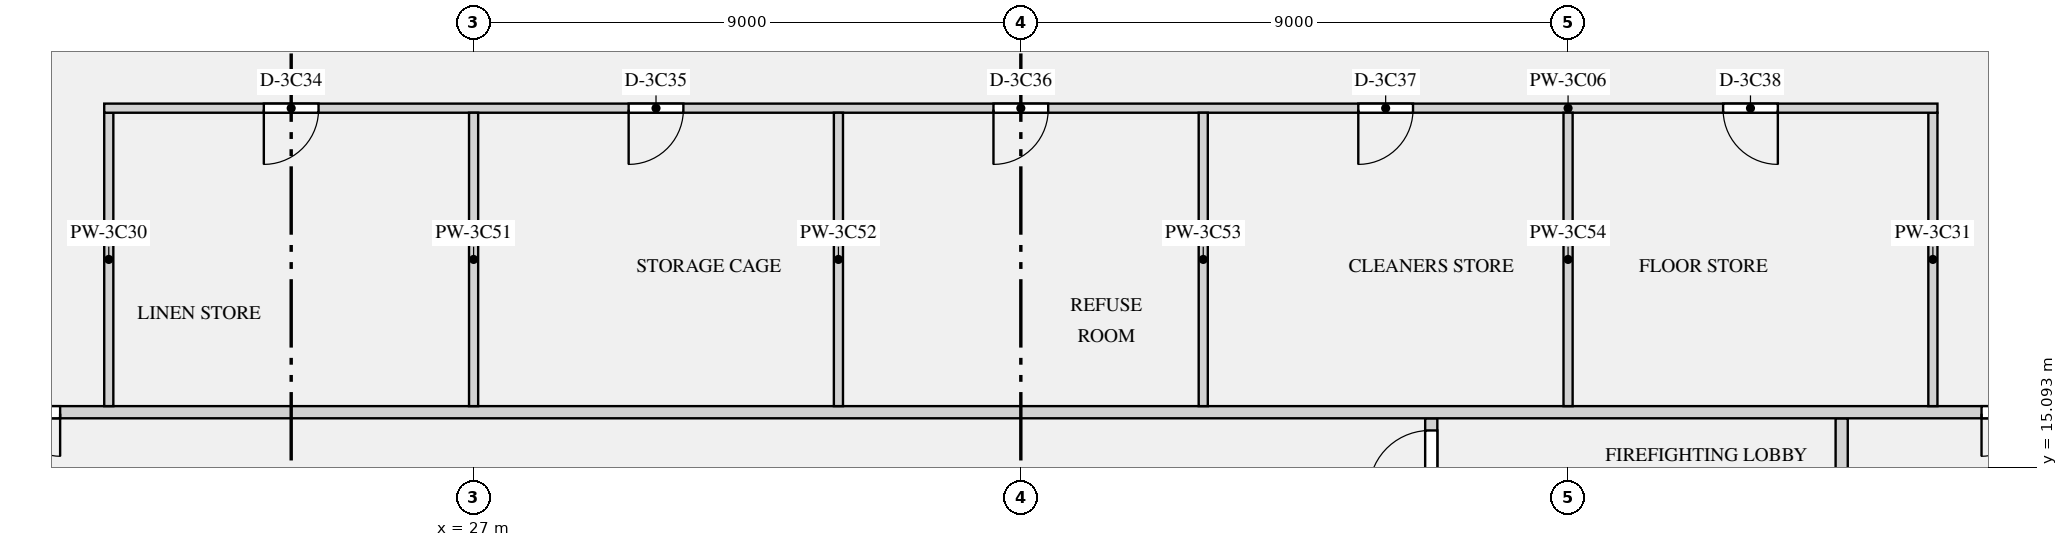
"""IFC4 building model, lengths in metres.
Left out: names, types, materials, properties, quantities, classifications, styles, units other than length and angle.
Written with IfcOpenShell. Run it as: python <this file> out.ifc"""

import sys

from ifc_helpers import new_model, si_unit, direction, frame, frame_2d, origin, place, context, subcontext, project, spatial, rectangle, extrude, element, fill, save


model = new_model("IFC4")
c1 = context("Model", 3, precision=1e-05, world=origin(), true_north=direction((0.0, 1.0)))
c2 = subcontext(c1, "Body", "Model", "MODEL_VIEW")
j1 = project(units=[si_unit("LENGTHUNIT", "METRE"), si_unit("PLANEANGLEUNIT", "RADIAN")], contexts=[c1])
p1 = place(None, origin())
s1 = spatial("IfcSite", under=j1, at=p1, CompositionType="ELEMENT")
p2 = place(p1, origin())
s2 = spatial("IfcBuilding", under=s1, at=p2, CompositionType="ELEMENT")
p3 = place(p2, frame((0.0, 0.0, 160.2)))
s3 = spatial("IfcBuildingStorey", under=s2, at=p3, CompositionType="ELEMENT", Elevation=160.2)
p4 = place(p3, frame((49.5, 12.5, 0.0), z_axis=(0.0, 0.0, 1.0), x_axis=(0.0, 1.0, 0.0)))
e1 = element("IfcWall", 1, at=p4, inside=s3, PredefinedType="PARTITIONING", context=c2, shape_type="SweptSolid", body=[
    extrude(rectangle(XDim=3.4, YDim=0.2, at=frame_2d((1.7, 0.0))), origin(), (0.0, 0.0, 1.0), 2.83),
])
p5 = place(p4, frame((1.15, 0.0, 0.0)))
e2 = element("IfcOpeningElement", 2, at=p5, cuts=e1, PredefinedType="OPENING", context=c2, shape_type="SweptSolid", body=[
    extrude(rectangle(XDim=1.1, YDim=2.1, at=frame_2d((0.55, 1.05))), frame((0.0, 0.11, 0.0), z_axis=(0.0, -1.0, 0.0), x_axis=(1.0, 0.0, 0.0)), (0.0, 0.0, 1.0), 0.22),
])
p6 = place(p3, frame((42.75, 14.575, 0.0), z_axis=(0.0, 0.0, 1.0), x_axis=(0.0, 1.0, 0.0)))
e3 = element("IfcWall", 3, at=p6, inside=s3, PredefinedType="PARTITIONING", context=c2, shape_type="SweptSolid", body=[
    extrude(rectangle(XDim=1.325, YDim=0.2, at=frame_2d((0.663, 0.0))), origin(), (0.0, 0.0, 1.0), 2.83),
])
p7 = place(p6, frame((0.125, 0.0, 0.0)))
e4 = element("IfcOpeningElement", 4, at=p7, cuts=e3, PredefinedType="OPENING", context=c2, shape_type="SweptSolid", body=[
    extrude(rectangle(XDim=1.0, YDim=2.1, at=frame_2d((0.5, 1.05))), frame((0.0, 0.11, 0.0), z_axis=(0.0, -1.0, 0.0), x_axis=(1.0, 0.0, 0.0)), (0.0, 0.0, 1.0), 0.22),
])
p8 = place(p3, frame((20.925, 21.0, 0.0), z_axis=(0.0, 0.0, 1.0), x_axis=(1.0, 0.0, 0.0)))
e5 = element("IfcWall", 5, at=p8, inside=s3, PredefinedType="PARTITIONING", context=c2, shape_type="SweptSolid", body=[
    extrude(rectangle(XDim=30.15, YDim=0.15, at=frame_2d((15.075, 0.0))), origin(), (0.0, 0.0, 1.0), 2.83),
])
p9 = place(p8, frame((2.625, 0.0, 0.0)))
e6 = element("IfcOpeningElement", 6, at=p9, cuts=e5, PredefinedType="OPENING", context=c2, shape_type="SweptSolid", body=[
    extrude(rectangle(XDim=0.9, YDim=2.1, at=frame_2d((0.45, 1.05))), frame((0.0, 0.085, 0.0), z_axis=(0.0, -1.0, 0.0), x_axis=(1.0, 0.0, 0.0)), (0.0, 0.0, 1.0), 0.17),
])
p10 = place(p8, frame((8.625, 0.0, 0.0)))
e7 = element("IfcOpeningElement", 7, at=p10, cuts=e5, PredefinedType="OPENING", context=c2, shape_type="SweptSolid", body=[
    extrude(rectangle(XDim=0.9, YDim=2.1, at=frame_2d((0.45, 1.05))), frame((0.0, 0.085, 0.0), z_axis=(0.0, -1.0, 0.0), x_axis=(1.0, 0.0, 0.0)), (0.0, 0.0, 1.0), 0.17),
])
p11 = place(p8, frame((14.625, 0.0, 0.0)))
e8 = element("IfcOpeningElement", 8, at=p11, cuts=e5, PredefinedType="OPENING", context=c2, shape_type="SweptSolid", body=[
    extrude(rectangle(XDim=0.9, YDim=2.1, at=frame_2d((0.45, 1.05))), frame((0.0, 0.085, 0.0), z_axis=(0.0, -1.0, 0.0), x_axis=(1.0, 0.0, 0.0)), (0.0, 0.0, 1.0), 0.17),
])
p12 = place(p8, frame((20.625, 0.0, 0.0)))
e9 = element("IfcOpeningElement", 9, at=p12, cuts=e5, PredefinedType="OPENING", context=c2, shape_type="SweptSolid", body=[
    extrude(rectangle(XDim=0.9, YDim=2.1, at=frame_2d((0.45, 1.05))), frame((0.0, 0.085, 0.0), z_axis=(0.0, -1.0, 0.0), x_axis=(1.0, 0.0, 0.0)), (0.0, 0.0, 1.0), 0.17),
])
p13 = place(p8, frame((26.625, 0.0, 0.0)))
e10 = element("IfcOpeningElement", 10, at=p13, cuts=e5, PredefinedType="OPENING", context=c2, shape_type="SweptSolid", body=[
    extrude(rectangle(XDim=0.9, YDim=2.1, at=frame_2d((0.45, 1.05))), frame((0.0, 0.085, 0.0), z_axis=(0.0, -1.0, 0.0), x_axis=(1.0, 0.0, 0.0)), (0.0, 0.0, 1.0), 0.17),
])
p14 = place(p3, frame((17.9, 16.0, 0.0), z_axis=(0.0, 0.0, 1.0), x_axis=(1.0, 0.0, 0.0)))
e11 = element("IfcWall", 11, at=p14, inside=s3, PredefinedType="PARTITIONING", context=c2, shape_type="SweptSolid", body=[
    extrude(rectangle(XDim=36.2, YDim=0.2, at=frame_2d((18.1, 0.0))), origin(), (0.0, 0.0, 1.0), 2.83),
])
p15 = place(p14, frame((0.9, 0.0, 0.0)))
e12 = element("IfcOpeningElement", 12, at=p15, cuts=e11, PredefinedType="OPENING", context=c2, shape_type="SweptSolid", body=[
    extrude(rectangle(XDim=1.4, YDim=2.1, at=frame_2d((0.7, 1.05))), frame((0.0, 0.11, 0.0), z_axis=(0.0, -1.0, 0.0), x_axis=(1.0, 0.0, 0.0)), (0.0, 0.0, 1.0), 0.22),
])
p16 = place(p14, frame((33.9, 0.0, 0.0)))
e13 = element("IfcOpeningElement", 13, at=p16, cuts=e11, PredefinedType="OPENING", context=c2, shape_type="SweptSolid", body=[
    extrude(rectangle(XDim=1.4, YDim=2.1, at=frame_2d((0.7, 1.05))), frame((0.0, 0.11, 0.0), z_axis=(0.0, -1.0, 0.0), x_axis=(1.0, 0.0, 0.0)), (0.0, 0.0, 1.0), 0.22),
])
for number, where, z_axis, x_axis in (
    (14, (21.0, 16.1, 0.0), (0.0, 0.0, 1.0), (0.0, 1.0, 0.0)),
    (15, (51.0, 16.1, 0.0), (0.0, 0.0, 1.0), (0.0, 1.0, 0.0)),
    (16, (27.0, 16.1, 0.0), (0.0, 0.0, 1.0), (0.0, 1.0, 0.0)),
    (17, (33.0, 16.1, 0.0), (0.0, 0.0, 1.0), (0.0, 1.0, 0.0)),
    (18, (39.0, 16.1, 0.0), (0.0, 0.0, 1.0), (0.0, 1.0, 0.0)),
    (19, (45.0, 16.1, 0.0), (0.0, 0.0, 1.0), (0.0, 1.0, 0.0)),
):
    element("IfcWall", number, at=place(p3, frame(where, z_axis=z_axis, x_axis=x_axis)), inside=s3, PredefinedType="PARTITIONING", context=c2, shape_type="SweptSolid", body=[
        extrude(rectangle(XDim=4.825, YDim=0.15, at=frame_2d((2.413, 0.0))), origin(), (0.0, 0.0, 1.0), 2.83),
    ])
p17 = place(p7, origin())
e20 = element("IfcDoor", 20, at=p17, inside=s3, OperationType="SINGLE_SWING_LEFT", PredefinedType="DOOR", context=c2, shape_type="SweptSolid", body=[
    extrude(rectangle(XDim=1.0, YDim=2.1, at=frame_2d((0.5, 1.05))), frame((0.0, 0.025, 0.0), z_axis=(0.0, -1.0, 0.0), x_axis=(1.0, 0.0, 0.0)), (0.0, 0.0, 1.0), 0.05),
])
fill(e4, e20)
p18 = place(p15, frame((1.4, 0.0, 0.0), z_axis=(0.0, 0.0, 1.0), x_axis=(-1.0, 0.0, 0.0)))
e21 = element("IfcDoor", 21, at=p18, inside=s3, OperationType="DOUBLE_DOOR_SINGLE_SWING", PredefinedType="DOOR", context=c2, shape_type="SweptSolid", body=[
    extrude(rectangle(XDim=1.4, YDim=2.1, at=frame_2d((0.7, 1.05))), frame((0.0, 0.025, 0.0), z_axis=(0.0, -1.0, 0.0), x_axis=(1.0, 0.0, 0.0)), (0.0, 0.0, 1.0), 0.05),
])
fill(e12, e21)
p19 = place(p16, frame((1.4, 0.0, 0.0), z_axis=(0.0, 0.0, 1.0), x_axis=(-1.0, 0.0, 0.0)))
e22 = element("IfcDoor", 22, at=p19, inside=s3, OperationType="DOUBLE_DOOR_SINGLE_SWING", PredefinedType="DOOR", context=c2, shape_type="SweptSolid", body=[
    extrude(rectangle(XDim=1.4, YDim=2.1, at=frame_2d((0.7, 1.05))), frame((0.0, 0.025, 0.0), z_axis=(0.0, -1.0, 0.0), x_axis=(1.0, 0.0, 0.0)), (0.0, 0.0, 1.0), 0.05),
])
fill(e13, e22)
p20 = place(p9, frame((0.9, 0.0, 0.0), z_axis=(0.0, 0.0, 1.0), x_axis=(-1.0, 0.0, 0.0)))
e23 = element("IfcDoor", 23, at=p20, inside=s3, OperationType="SINGLE_SWING_RIGHT", PredefinedType="DOOR", context=c2, shape_type="SweptSolid", body=[
    extrude(rectangle(XDim=0.9, YDim=2.1, at=frame_2d((0.45, 1.05))), frame((0.0, 0.025, 0.0), z_axis=(0.0, -1.0, 0.0), x_axis=(1.0, 0.0, 0.0)), (0.0, 0.0, 1.0), 0.05),
])
fill(e6, e23)
p21 = place(p10, frame((0.9, 0.0, 0.0), z_axis=(0.0, 0.0, 1.0), x_axis=(-1.0, 0.0, 0.0)))
e24 = element("IfcDoor", 24, at=p21, inside=s3, OperationType="SINGLE_SWING_RIGHT", PredefinedType="DOOR", context=c2, shape_type="SweptSolid", body=[
    extrude(rectangle(XDim=0.9, YDim=2.1, at=frame_2d((0.45, 1.05))), frame((0.0, 0.025, 0.0), z_axis=(0.0, -1.0, 0.0), x_axis=(1.0, 0.0, 0.0)), (0.0, 0.0, 1.0), 0.05),
])
fill(e7, e24)
p22 = place(p11, frame((0.9, 0.0, 0.0), z_axis=(0.0, 0.0, 1.0), x_axis=(-1.0, 0.0, 0.0)))
e25 = element("IfcDoor", 25, at=p22, inside=s3, OperationType="SINGLE_SWING_RIGHT", PredefinedType="DOOR", context=c2, shape_type="SweptSolid", body=[
    extrude(rectangle(XDim=0.9, YDim=2.1, at=frame_2d((0.45, 1.05))), frame((0.0, 0.025, 0.0), z_axis=(0.0, -1.0, 0.0), x_axis=(1.0, 0.0, 0.0)), (0.0, 0.0, 1.0), 0.05),
])
fill(e8, e25)
p23 = place(p12, frame((0.9, 0.0, 0.0), z_axis=(0.0, 0.0, 1.0), x_axis=(-1.0, 0.0, 0.0)))
e26 = element("IfcDoor", 26, at=p23, inside=s3, OperationType="SINGLE_SWING_RIGHT", PredefinedType="DOOR", context=c2, shape_type="SweptSolid", body=[
    extrude(rectangle(XDim=0.9, YDim=2.1, at=frame_2d((0.45, 1.05))), frame((0.0, 0.025, 0.0), z_axis=(0.0, -1.0, 0.0), x_axis=(1.0, 0.0, 0.0)), (0.0, 0.0, 1.0), 0.05),
])
fill(e9, e26)
p24 = place(p13, frame((0.9, 0.0, 0.0), z_axis=(0.0, 0.0, 1.0), x_axis=(-1.0, 0.0, 0.0)))
e27 = element("IfcDoor", 27, at=p24, inside=s3, OperationType="SINGLE_SWING_LEFT", PredefinedType="DOOR", context=c2, shape_type="SweptSolid", body=[
    extrude(rectangle(XDim=0.9, YDim=2.1, at=frame_2d((0.45, 1.05))), frame((0.0, 0.025, 0.0), z_axis=(0.0, -1.0, 0.0), x_axis=(1.0, 0.0, 0.0)), (0.0, 0.0, 1.0), 0.05),
])
fill(e10, e27)
save(model, sys.argv[1])
